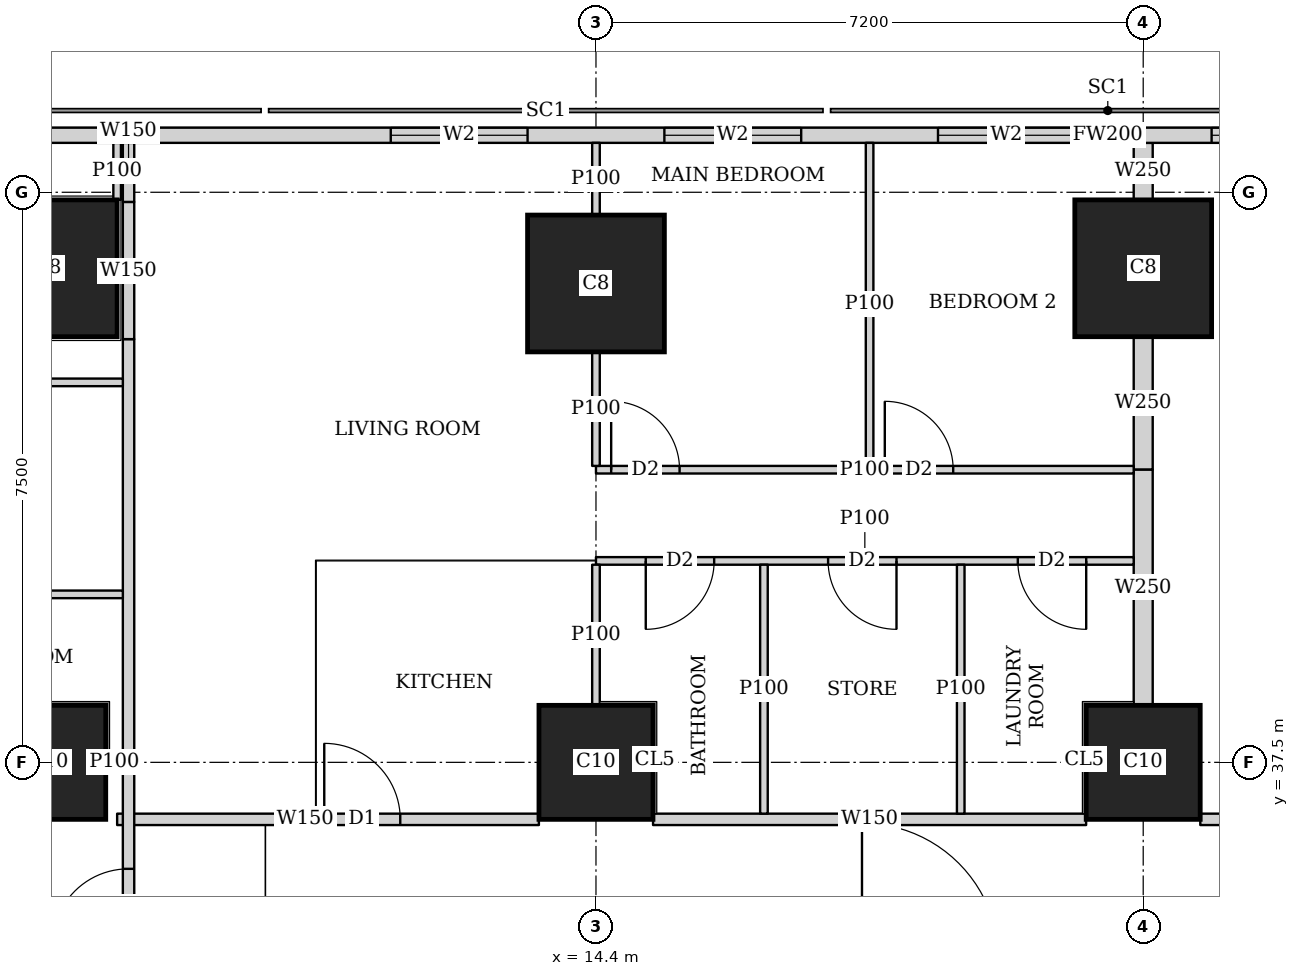
"""IFC4 building model, lengths in metres.
Left out: names, types, materials, properties, quantities, classifications, styles, units other than length and angle.
Written with IfcOpenShell. Run it as: python <this file> out.ifc"""

import sys

from ifc_helpers import new_model, si_unit, direction, frame, frame_2d, origin, origin_2d, place, context, subcontext, project, spatial, rectangle, extrude, element, fill, save


model = new_model("IFC4")
c1 = context("Model", 3, precision=1e-05, world=origin(), true_north=direction((0.0, 1.0)))
c2 = subcontext(c1, "Body", "Model", "MODEL_VIEW")
j1 = project(units=[si_unit("LENGTHUNIT", "METRE"), si_unit("PLANEANGLEUNIT", "RADIAN")], contexts=[c1])
p1 = place(None, origin())
s1 = spatial("IfcSite", under=j1, at=p1, CompositionType="ELEMENT")
p2 = place(p1, origin())
s2 = spatial("IfcBuilding", under=s1, at=p2, CompositionType="ELEMENT")
p3 = place(p2, frame((0.0, 0.0, 169.55)))
s3 = spatial("IfcBuildingStorey", under=s2, at=p3, CompositionType="ELEMENT", Elevation=169.55)
for number, where, z_axis, x_axis in (
    (1, (7.2, 37.5, 0.0), (0.0, 0.0, 1.0), (1.0, 0.0, 0.0)),
    (2, (14.4, 37.5, 0.0), (0.0, 0.0, 1.0), (1.0, 0.0, 0.0)),
    (3, (21.6, 37.5, 0.0), (0.0, 0.0, 1.0), (1.0, 0.0, 0.0)),
):
    element("IfcColumn", number, at=place(p3, frame(where, z_axis=z_axis, x_axis=x_axis)), inside=s3, PredefinedType="COLUMN", context=c2, shape_type="SweptSolid", body=[
        extrude(rectangle(XDim=1.5, YDim=1.5, at=origin_2d()), origin(), (0.0, 0.0, 1.0), 3.75),
    ])
for number, where, z_axis, x_axis in (
    (4, (7.2, 44.0, 0.0), (0.0, 0.0, 1.0), (1.0, 0.0, 0.0)),
    (5, (14.4, 43.8, 0.0), (0.0, 0.0, 1.0), (1.0, 0.0, 0.0)),
    (6, (21.6, 44.0, 0.0), (0.0, 0.0, 1.0), (1.0, 0.0, 0.0)),
):
    element("IfcColumn", number, at=place(p3, frame(where, z_axis=z_axis, x_axis=x_axis)), inside=s3, PredefinedType="COLUMN", context=c2, shape_type="SweptSolid", body=[
        extrude(rectangle(XDim=1.8, YDim=1.8, at=origin_2d()), origin(), (0.0, 0.0, 1.0), 3.75),
    ])
p4 = place(p3, frame((40.106, 45.75, 0.0), z_axis=(0.0, 0.0, 1.0), x_axis=(-1.0, 0.0, 0.0)))
e7 = element("IfcWall", 7, at=p4, inside=s3, PredefinedType="SOLIDWALL", context=c2, shape_type="SweptSolid", body=[
    extrude(rectangle(XDim=37.943, YDim=0.2, at=frame_2d((18.971, 0.0))), origin(), (0.0, 0.0, 1.0), 3.5),
])
p5 = place(p4, frame((8.606, 0.0, 0.9)))
e8 = element("IfcOpeningElement", 8, at=p5, cuts=e7, PredefinedType="OPENING", context=c2, shape_type="SweptSolid", body=[
    extrude(rectangle(XDim=1.8, YDim=1.5, at=frame_2d((0.9, 0.75))), frame((0.0, 0.11, 0.0), z_axis=(0.0, -1.0, 0.0), x_axis=(1.0, 0.0, 0.0)), (0.0, 0.0, 1.0), 0.22),
])
p6 = place(p4, frame((12.206, 0.0, 0.9)))
e9 = element("IfcOpeningElement", 9, at=p6, cuts=e7, PredefinedType="OPENING", context=c2, shape_type="SweptSolid", body=[
    extrude(rectangle(XDim=1.8, YDim=1.5, at=frame_2d((0.9, 0.75))), frame((0.0, 0.11, 0.0), z_axis=(0.0, -1.0, 0.0), x_axis=(1.0, 0.0, 0.0)), (0.0, 0.0, 1.0), 0.22),
])
p7 = place(p4, frame((15.806, 0.0, 0.9)))
e10 = element("IfcOpeningElement", 10, at=p7, cuts=e7, PredefinedType="OPENING", context=c2, shape_type="SweptSolid", body=[
    extrude(rectangle(XDim=1.8, YDim=1.5, at=frame_2d((0.9, 0.75))), frame((0.0, 0.11, 0.0), z_axis=(0.0, -1.0, 0.0), x_axis=(1.0, 0.0, 0.0)), (0.0, 0.0, 1.0), 0.22),
])
p8 = place(p4, frame((19.406, 0.0, 0.9)))
e11 = element("IfcOpeningElement", 11, at=p8, cuts=e7, PredefinedType="OPENING", context=c2, shape_type="SweptSolid", body=[
    extrude(rectangle(XDim=1.8, YDim=1.5, at=frame_2d((0.9, 0.75))), frame((0.0, 0.11, 0.0), z_axis=(0.0, -1.0, 0.0), x_axis=(1.0, 0.0, 0.0)), (0.0, 0.0, 1.0), 0.22),
])
p9 = place(p4, frame((23.006, 0.0, 0.9)))
e12 = element("IfcOpeningElement", 12, at=p9, cuts=e7, PredefinedType="OPENING", context=c2, shape_type="SweptSolid", body=[
    extrude(rectangle(XDim=1.8, YDim=1.5, at=frame_2d((0.9, 0.75))), frame((0.0, 0.11, 0.0), z_axis=(0.0, -1.0, 0.0), x_axis=(1.0, 0.0, 0.0)), (0.0, 0.0, 1.0), 0.22),
])
p10 = place(p4, frame((26.606, 0.0, 0.9)))
e13 = element("IfcOpeningElement", 13, at=p10, cuts=e7, PredefinedType="OPENING", context=c2, shape_type="SweptSolid", body=[
    extrude(rectangle(XDim=1.8, YDim=1.5, at=frame_2d((0.9, 0.75))), frame((0.0, 0.11, 0.0), z_axis=(0.0, -1.0, 0.0), x_axis=(1.0, 0.0, 0.0)), (0.0, 0.0, 1.0), 0.22),
])
p11 = place(p3, frame((8.25, 1.957, 0.0), z_axis=(0.0, 0.0, 1.0), x_axis=(0.0, 1.0, 0.0)))
e14 = element("IfcWall", 14, at=p11, inside=s3, PredefinedType="SOLIDWALL", context=c2, shape_type="SweptSolid", body=[
    extrude(rectangle(XDim=41.111, YDim=0.15, at=frame_2d((20.556, 0.0))), origin(), (0.0, 0.0, 1.0), 3.5),
])
p12 = place(p11, frame((10.642, 0.0, 0.0)))
e15 = element("IfcOpeningElement", 15, at=p12, cuts=e14, PredefinedType="OPENING", context=c2, shape_type="SweptSolid", body=[
    extrude(rectangle(XDim=1.0, YDim=2.1, at=frame_2d((0.5, 1.05))), frame((0.0, 0.085, 0.0), z_axis=(0.0, -1.0, 0.0), x_axis=(1.0, 0.0, 0.0)), (0.0, 0.0, 1.0), 0.17),
])
p13 = place(p11, frame((15.042, 0.0, 0.0)))
e16 = element("IfcOpeningElement", 16, at=p13, cuts=e14, PredefinedType="OPENING", context=c2, shape_type="SweptSolid", body=[
    extrude(rectangle(XDim=1.0, YDim=2.1, at=frame_2d((0.5, 1.05))), frame((0.0, 0.085, 0.0), z_axis=(0.0, -1.0, 0.0), x_axis=(1.0, 0.0, 0.0)), (0.0, 0.0, 1.0), 0.17),
])
p14 = place(p11, frame((22.543, 0.0, 0.0)))
e17 = element("IfcOpeningElement", 17, at=p14, cuts=e14, PredefinedType="OPENING", context=c2, shape_type="SweptSolid", body=[
    extrude(rectangle(XDim=1.0, YDim=2.1, at=frame_2d((0.5, 1.05))), frame((0.0, 0.085, 0.0), z_axis=(0.0, -1.0, 0.0), x_axis=(1.0, 0.0, 0.0)), (0.0, 0.0, 1.0), 0.17),
])
p15 = place(p11, frame((33.142, 0.0, 0.0)))
e18 = element("IfcOpeningElement", 18, at=p15, cuts=e14, PredefinedType="OPENING", context=c2, shape_type="SweptSolid", body=[
    extrude(rectangle(XDim=1.0, YDim=2.1, at=frame_2d((0.5, 1.05))), frame((0.0, 0.085, 0.0), z_axis=(0.0, -1.0, 0.0), x_axis=(1.0, 0.0, 0.0)), (0.0, 0.0, 1.0), 0.17),
])
p16 = place(p3, frame((8.25, 43.068, 0.0), z_axis=(0.0, 0.0, 1.0), x_axis=(0.0, 1.0, 0.0)))
e19 = element("IfcWall", 19, at=p16, inside=s3, PredefinedType="SOLIDWALL", context=c2, shape_type="SweptSolid", body=[
    extrude(rectangle(XDim=1.805, YDim=0.15, at=frame_2d((0.902, 0.0))), origin(), (0.0, 0.0, 1.0), 2.1),
])
p17 = place(p3, frame((8.25, 44.873, 0.0), z_axis=(0.0, 0.0, 1.0), x_axis=(0.0, 1.0, 0.0)))
e20 = element("IfcWall", 20, at=p17, inside=s3, PredefinedType="SOLIDWALL", context=c2, shape_type="SweptSolid", body=[
    extrude(rectangle(XDim=0.777, YDim=0.15, at=frame_2d((0.388, 0.0))), origin(), (0.0, 0.0, 1.0), 3.5),
])
p18 = place(p3, frame((8.1, 36.75, 0.0), z_axis=(0.0, 0.0, 1.0), x_axis=(1.0, 0.0, 0.0)))
e21 = element("IfcWall", 21, at=p18, inside=s3, PredefinedType="SOLIDWALL", context=c2, shape_type="SweptSolid", body=[
    extrude(rectangle(XDim=5.549, YDim=0.15, at=frame_2d((2.774, 0.0))), origin(), (0.0, 0.0, 1.0), 3.5),
])
p19 = place(p18, frame((2.725, 0.0, 0.0)))
e22 = element("IfcOpeningElement", 22, at=p19, cuts=e21, PredefinedType="OPENING", context=c2, shape_type="SweptSolid", body=[
    extrude(rectangle(XDim=1.0, YDim=2.1, at=frame_2d((0.5, 1.05))), frame((0.0, 0.085, 0.0), z_axis=(0.0, -1.0, 0.0), x_axis=(1.0, 0.0, 0.0)), (0.0, 0.0, 1.0), 0.17),
])
p20 = place(p3, frame((15.151, 36.75, 0.0), z_axis=(0.0, 0.0, 1.0), x_axis=(1.0, 0.0, 0.0)))
e23 = element("IfcWall", 23, at=p20, inside=s3, PredefinedType="SOLIDWALL", context=c2, shape_type="SweptSolid", body=[
    extrude(rectangle(XDim=5.698, YDim=0.15, at=frame_2d((2.849, 0.0))), origin(), (0.0, 0.0, 1.0), 3.5),
])
p21 = place(p3, frame((22.351, 36.75, 0.0), z_axis=(0.0, 0.0, 1.0), x_axis=(1.0, 0.0, 0.0)))
e24 = element("IfcWall", 24, at=p21, inside=s3, PredefinedType="SOLIDWALL", context=c2, shape_type="SweptSolid", body=[
    extrude(rectangle(XDim=5.698, YDim=0.15, at=frame_2d((2.849, 0.0))), origin(), (0.0, 0.0, 1.0), 3.5),
])
p22 = place(p21, frame((1.149, 0.0, 0.0)))
e25 = element("IfcOpeningElement", 25, at=p22, cuts=e24, PredefinedType="OPENING", context=c2, shape_type="SweptSolid", body=[
    extrude(rectangle(XDim=1.0, YDim=2.1, at=frame_2d((0.5, 1.05))), frame((0.0, 0.085, 0.0), z_axis=(0.0, -1.0, 0.0), x_axis=(1.0, 0.0, 0.0)), (0.0, 0.0, 1.0), 0.17),
])
p23 = place(p3, frame((8.1, 45.65, 0.0), z_axis=(0.0, 0.0, 1.0), x_axis=(0.0, -1.0, 0.0)))
e26 = element("IfcWall", 26, at=p23, inside=s3, PredefinedType="PARTITIONING", context=c2, shape_type="SweptSolid", body=[
    extrude(rectangle(XDim=0.749, YDim=0.1, at=frame_2d((0.375, 0.0))), origin(), (0.0, 0.0, 1.0), 3.5),
])
p24 = place(p3, frame((7.951, 37.5, 0.0), z_axis=(0.0, 0.0, 1.0), x_axis=(1.0, 0.0, 0.0)))
e27 = element("IfcWall", 27, at=p24, inside=s3, PredefinedType="PARTITIONING", context=c2, shape_type="SweptSolid", body=[
    extrude(rectangle(XDim=0.224, YDim=0.1, at=frame_2d((0.112, 0.0))), origin(), (0.0, 0.0, 1.0), 3.5),
])
for number, where, z_axis, x_axis in (
    (28, (4.9, 42.499, 0.0), (0.0, 0.0, 1.0), (1.0, 0.0, 0.0)),
    (29, (4.9, 39.71, 0.0), (0.0, 0.0, 1.0), (1.0, 0.0, 0.0)),
):
    element("IfcWall", number, at=place(p3, frame(where, z_axis=z_axis, x_axis=x_axis)), inside=s3, PredefinedType="PARTITIONING", context=c2, shape_type="SweptSolid", body=[
        extrude(rectangle(XDim=3.275, YDim=0.1, at=frame_2d((1.638, 0.0))), origin(), (0.0, 0.0, 1.0), 3.5),
    ])
p25 = place(p3, frame((14.4, 41.35, 0.0), z_axis=(0.0, 0.0, 1.0), x_axis=(1.0, 0.0, 0.0)))
e30 = element("IfcWall", 30, at=p25, inside=s3, PredefinedType="PARTITIONING", context=c2, shape_type="SweptSolid", body=[
    extrude(rectangle(XDim=7.075, YDim=0.1, at=frame_2d((3.538, 0.0))), origin(), (0.0, 0.0, 1.0), 3.5),
])
p26 = place(p25, frame((0.2, 0.0, 0.0)))
e31 = element("IfcOpeningElement", 31, at=p26, cuts=e30, PredefinedType="OPENING", context=c2, shape_type="SweptSolid", body=[
    extrude(rectangle(XDim=0.9, YDim=2.1, at=frame_2d((0.45, 1.05))), frame((0.0, 0.06, 0.0), z_axis=(0.0, -1.0, 0.0), x_axis=(1.0, 0.0, 0.0)), (0.0, 0.0, 1.0), 0.12),
])
p27 = place(p25, frame((3.8, 0.0, 0.0)))
e32 = element("IfcOpeningElement", 32, at=p27, cuts=e30, PredefinedType="OPENING", context=c2, shape_type="SweptSolid", body=[
    extrude(rectangle(XDim=0.9, YDim=2.1, at=frame_2d((0.45, 1.05))), frame((0.0, 0.06, 0.0), z_axis=(0.0, -1.0, 0.0), x_axis=(1.0, 0.0, 0.0)), (0.0, 0.0, 1.0), 0.12),
])
p28 = place(p3, frame((14.4, 40.15, 0.0), z_axis=(0.0, 0.0, 1.0), x_axis=(1.0, 0.0, 0.0)))
e33 = element("IfcWall", 33, at=p28, inside=s3, PredefinedType="PARTITIONING", context=c2, shape_type="SweptSolid", body=[
    extrude(rectangle(XDim=7.075, YDim=0.1, at=frame_2d((3.538, 0.0))), origin(), (0.0, 0.0, 1.0), 3.5),
])
p29 = place(p28, frame((0.655, 0.0, 0.0)))
e34 = element("IfcOpeningElement", 34, at=p29, cuts=e33, PredefinedType="OPENING", context=c2, shape_type="SweptSolid", body=[
    extrude(rectangle(XDim=0.9, YDim=2.1, at=frame_2d((0.45, 1.05))), frame((0.0, 0.06, 0.0), z_axis=(0.0, -1.0, 0.0), x_axis=(1.0, 0.0, 0.0)), (0.0, 0.0, 1.0), 0.12),
])
p30 = place(p28, frame((5.55, 0.0, 0.0)))
e35 = element("IfcOpeningElement", 35, at=p30, cuts=e33, PredefinedType="OPENING", context=c2, shape_type="SweptSolid", body=[
    extrude(rectangle(XDim=0.9, YDim=2.1, at=frame_2d((0.45, 1.05))), frame((0.0, 0.06, 0.0), z_axis=(0.0, -1.0, 0.0), x_axis=(1.0, 0.0, 0.0)), (0.0, 0.0, 1.0), 0.12),
])
p31 = place(p28, frame((3.054, 0.0, 0.0)))
e36 = element("IfcOpeningElement", 36, at=p31, cuts=e33, PredefinedType="OPENING", context=c2, shape_type="SweptSolid", body=[
    extrude(rectangle(XDim=0.9, YDim=2.1, at=frame_2d((0.45, 1.05))), frame((0.0, 0.06, 0.0), z_axis=(0.0, -1.0, 0.0), x_axis=(1.0, 0.0, 0.0)), (0.0, 0.0, 1.0), 0.12),
])
p32 = place(p3, frame((14.4, 41.4, 0.0), z_axis=(0.0, 0.0, 1.0), x_axis=(0.0, 1.0, 0.0)))
e37 = element("IfcWall", 37, at=p32, inside=s3, PredefinedType="PARTITIONING", context=c2, shape_type="SweptSolid", body=[
    extrude(rectangle(XDim=1.499, YDim=0.1, at=frame_2d((0.75, 0.0))), origin(), (0.0, 0.0, 1.0), 3.5),
])
p33 = place(p3, frame((14.4, 44.701, 0.0), z_axis=(0.0, 0.0, 1.0), x_axis=(0.0, 1.0, 0.0)))
e38 = element("IfcWall", 38, at=p33, inside=s3, PredefinedType="PARTITIONING", context=c2, shape_type="SweptSolid", body=[
    extrude(rectangle(XDim=0.949, YDim=0.1, at=frame_2d((0.475, 0.0))), origin(), (0.0, 0.0, 1.0), 3.5),
])
p34 = place(p3, frame((18.0, 41.4, 0.0), z_axis=(0.0, 0.0, 1.0), x_axis=(0.0, 1.0, 0.0)))
e39 = element("IfcWall", 39, at=p34, inside=s3, PredefinedType="PARTITIONING", context=c2, shape_type="SweptSolid", body=[
    extrude(rectangle(XDim=4.25, YDim=0.1, at=frame_2d((2.125, 0.0))), origin(), (0.0, 0.0, 1.0), 2.1),
])
p35 = place(p3, frame((14.4, 38.251, 0.0), z_axis=(0.0, 0.0, 1.0), x_axis=(0.0, 1.0, 0.0)))
e40 = element("IfcWall", 40, at=p35, inside=s3, PredefinedType="PARTITIONING", context=c2, shape_type="SweptSolid", body=[
    extrude(rectangle(XDim=1.849, YDim=0.1, at=frame_2d((0.925, 0.0))), origin(), (0.0, 0.0, 1.0), 3.5),
])
for number, where, z_axis, x_axis in (
    (41, (19.199, 36.825, 0.0), (0.0, 0.0, 1.0), (0.0, 1.0, 0.0)),
    (42, (16.61, 36.825, 0.0), (0.0, 0.0, 1.0), (0.0, 1.0, 0.0)),
):
    element("IfcWall", number, at=place(p3, frame(where, z_axis=z_axis, x_axis=x_axis)), inside=s3, PredefinedType="PARTITIONING", context=c2, shape_type="SweptSolid", body=[
        extrude(rectangle(XDim=3.275, YDim=0.1, at=frame_2d((1.638, 0.0))), origin(), (0.0, 0.0, 1.0), 3.5),
    ])
p36 = place(p3, frame((21.6, 41.35, 0.0), z_axis=(0.0, 0.0, 1.0), x_axis=(0.0, 1.0, 0.0)))
e43 = element("IfcWall", 43, at=p36, inside=s3, PredefinedType="SOLIDWALL", context=c2, shape_type="SweptSolid", body=[
    extrude(rectangle(XDim=1.749, YDim=0.25, at=frame_2d((0.875, 0.0))), origin(), (0.0, 0.0, 1.0), 2.1),
])
p37 = place(p3, frame((21.6, 44.901, 0.0), z_axis=(0.0, 0.0, 1.0), x_axis=(0.0, 1.0, 0.0)))
e44 = element("IfcWall", 44, at=p37, inside=s3, PredefinedType="SOLIDWALL", context=c2, shape_type="SweptSolid", body=[
    extrude(rectangle(XDim=0.749, YDim=0.25, at=frame_2d((0.375, 0.0))), origin(), (0.0, 0.0, 1.0), 2.1),
])
p38 = place(p3, frame((21.6, 38.251, 0.0), z_axis=(0.0, 0.0, 1.0), x_axis=(0.0, 1.0, 0.0)))
e45 = element("IfcWall", 45, at=p38, inside=s3, PredefinedType="SOLIDWALL", context=c2, shape_type="SweptSolid", body=[
    extrude(rectangle(XDim=3.099, YDim=0.25, at=frame_2d((1.55, 0.0))), origin(), (0.0, 0.0, 1.0), 3.5),
])
p39 = place(p7, origin())
e46 = element("IfcWindow", 46, at=p39, inside=s3, PartitioningType="SINGLE_PANEL", PredefinedType="WINDOW", context=c2, shape_type="SweptSolid", body=[
    extrude(rectangle(XDim=1.8, YDim=1.5, at=frame_2d((0.9, 0.75))), frame((0.0, 0.03, 0.0), z_axis=(0.0, -1.0, 0.0), x_axis=(1.0, 0.0, 0.0)), (0.0, 0.0, 1.0), 0.06),
])
fill(e10, e46)
p40 = place(p8, origin())
e47 = element("IfcWindow", 47, at=p40, inside=s3, PartitioningType="SINGLE_PANEL", PredefinedType="WINDOW", context=c2, shape_type="SweptSolid", body=[
    extrude(rectangle(XDim=1.8, YDim=1.5, at=frame_2d((0.9, 0.75))), frame((0.0, 0.03, 0.0), z_axis=(0.0, -1.0, 0.0), x_axis=(1.0, 0.0, 0.0)), (0.0, 0.0, 1.0), 0.06),
])
fill(e11, e47)
p41 = place(p9, origin())
e48 = element("IfcWindow", 48, at=p41, inside=s3, PartitioningType="SINGLE_PANEL", PredefinedType="WINDOW", context=c2, shape_type="SweptSolid", body=[
    extrude(rectangle(XDim=1.8, YDim=1.5, at=frame_2d((0.9, 0.75))), frame((0.0, 0.03, 0.0), z_axis=(0.0, -1.0, 0.0), x_axis=(1.0, 0.0, 0.0)), (0.0, 0.0, 1.0), 0.06),
])
fill(e12, e48)
p42 = place(p10, origin())
e49 = element("IfcWindow", 49, at=p42, inside=s3, PartitioningType="SINGLE_PANEL", PredefinedType="WINDOW", context=c2, shape_type="SweptSolid", body=[
    extrude(rectangle(XDim=1.8, YDim=1.5, at=frame_2d((0.9, 0.75))), frame((0.0, 0.03, 0.0), z_axis=(0.0, -1.0, 0.0), x_axis=(1.0, 0.0, 0.0)), (0.0, 0.0, 1.0), 0.06),
])
fill(e13, e49)
p43 = place(p15, origin())
e50 = element("IfcDoor", 50, at=p43, inside=s3, OperationType="SINGLE_SWING_LEFT", PredefinedType="DOOR", context=c2, shape_type="SweptSolid", body=[
    extrude(rectangle(XDim=1.0, YDim=2.1, at=frame_2d((0.5, 1.05))), frame((0.0, 0.025, 0.0), z_axis=(0.0, -1.0, 0.0), x_axis=(1.0, 0.0, 0.0)), (0.0, 0.0, 1.0), 0.05),
])
fill(e18, e50)
p44 = place(p26, origin())
e51 = element("IfcDoor", 51, at=p44, inside=s3, OperationType="SINGLE_SWING_LEFT", PredefinedType="DOOR", context=c2, shape_type="SweptSolid", body=[
    extrude(rectangle(XDim=0.9, YDim=2.1, at=frame_2d((0.45, 1.05))), frame((0.0, 0.025, 0.0), z_axis=(0.0, -1.0, 0.0), x_axis=(1.0, 0.0, 0.0)), (0.0, 0.0, 1.0), 0.05),
])
fill(e31, e51)
p45 = place(p27, origin())
e52 = element("IfcDoor", 52, at=p45, inside=s3, OperationType="SINGLE_SWING_LEFT", PredefinedType="DOOR", context=c2, shape_type="SweptSolid", body=[
    extrude(rectangle(XDim=0.9, YDim=2.1, at=frame_2d((0.45, 1.05))), frame((0.0, 0.025, 0.0), z_axis=(0.0, -1.0, 0.0), x_axis=(1.0, 0.0, 0.0)), (0.0, 0.0, 1.0), 0.05),
])
fill(e32, e52)
p46 = place(p29, origin())
e53 = element("IfcDoor", 53, at=p46, inside=s3, OperationType="SINGLE_SWING_RIGHT", PredefinedType="DOOR", context=c2, shape_type="SweptSolid", body=[
    extrude(rectangle(XDim=0.9, YDim=2.1, at=frame_2d((0.45, 1.05))), frame((0.0, 0.025, 0.0), z_axis=(0.0, -1.0, 0.0), x_axis=(1.0, 0.0, 0.0)), (0.0, 0.0, 1.0), 0.05),
])
fill(e34, e53)
p47 = place(p30, origin())
e54 = element("IfcDoor", 54, at=p47, inside=s3, OperationType="SINGLE_SWING_LEFT", PredefinedType="DOOR", context=c2, shape_type="SweptSolid", body=[
    extrude(rectangle(XDim=0.9, YDim=2.1, at=frame_2d((0.45, 1.05))), frame((0.0, 0.025, 0.0), z_axis=(0.0, -1.0, 0.0), x_axis=(1.0, 0.0, 0.0)), (0.0, 0.0, 1.0), 0.05),
])
fill(e35, e54)
p48 = place(p31, origin())
e55 = element("IfcDoor", 55, at=p48, inside=s3, OperationType="SINGLE_SWING_LEFT", PredefinedType="DOOR", context=c2, shape_type="SweptSolid", body=[
    extrude(rectangle(XDim=0.9, YDim=2.1, at=frame_2d((0.45, 1.05))), frame((0.0, 0.025, 0.0), z_axis=(0.0, -1.0, 0.0), x_axis=(1.0, 0.0, 0.0)), (0.0, 0.0, 1.0), 0.05),
])
fill(e36, e55)
p49 = place(p19, origin())
e56 = element("IfcDoor", 56, at=p49, inside=s3, OperationType="SINGLE_SWING_LEFT", PredefinedType="DOOR", context=c2, shape_type="SweptSolid", body=[
    extrude(rectangle(XDim=1.0, YDim=2.1, at=frame_2d((0.5, 1.05))), frame((0.0, 0.025, 0.0), z_axis=(0.0, -1.0, 0.0), x_axis=(1.0, 0.0, 0.0)), (0.0, 0.0, 1.0), 0.05),
])
fill(e22, e56)
save(model, sys.argv[1])
